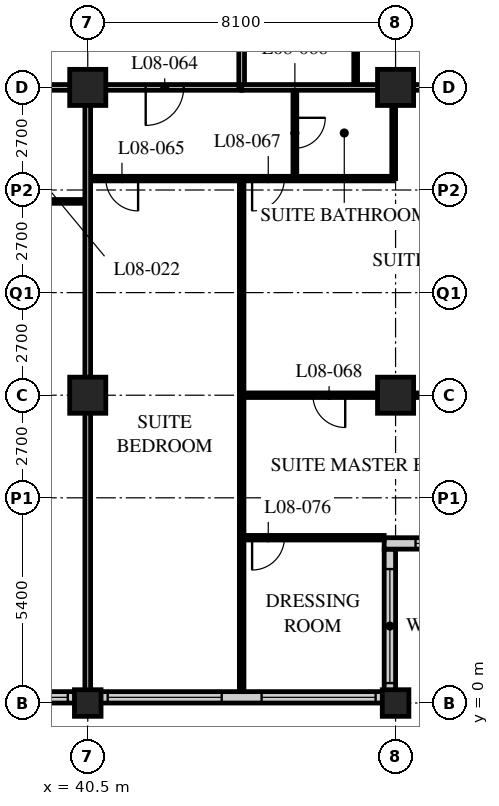
"""IFC4 building model, lengths in metres.
Left out: names, types, materials, properties, quantities, classifications, styles, units other than length and angle.
Written with IfcOpenShell. Run it as: python <this file> out.ifc"""

import sys

from ifc_helpers import new_model, si_unit, direction, frame, frame_2d, origin, origin_2d, place, context, subcontext, project, spatial, rectangle, hollow_rectangle, extrude, element, fill, save


model = new_model("IFC4")
c1 = context("Model", 3, precision=1e-05, world=origin(), true_north=direction((0.0, 1.0)))
c2 = subcontext(c1, "Body", "Model", "MODEL_VIEW")
j1 = project(units=[si_unit("LENGTHUNIT", "METRE"), si_unit("PLANEANGLEUNIT", "RADIAN")], contexts=[c1])
p1 = place(None, origin())
s1 = spatial("IfcSite", under=j1, at=p1, CompositionType="ELEMENT")
p2 = place(p1, origin())
s2 = spatial("IfcBuilding", under=s1, at=p2, CompositionType="ELEMENT")
p3 = place(p2, frame((0.0, 0.0, 39.8)))
s3 = spatial("IfcBuildingStorey", under=s2, at=p3, CompositionType="ELEMENT", Elevation=39.8)
p4 = place(p3, frame((40.5, 0.0, 0.0), z_axis=(0.0, 0.0, 1.0), x_axis=(1.0, 0.0, 0.0)))
e1 = element("IfcColumn", 1, at=p4, inside=s3, PredefinedType="COLUMN", context=c2, shape_type="SweptSolid", body=[
    extrude(hollow_rectangle(XDim=0.7, YDim=0.7, WallThickness=0.06, at=origin_2d()), origin(), (0.0, 0.0, 1.0), 3.4),
])
for number, where, z_axis, x_axis in (
    (2, (40.5, 8.1, 0.0), (0.0, 0.0, 1.0), (1.0, 0.0, 0.0)),
    (3, (40.5, 16.2, 0.0), (0.0, 0.0, 1.0), (1.0, 0.0, 0.0)),
):
    element("IfcColumn", number, at=place(p3, frame(where, z_axis=z_axis, x_axis=x_axis)), inside=s3, PredefinedType="COLUMN", context=c2, shape_type="SweptSolid", body=[
        extrude(hollow_rectangle(XDim=0.95, YDim=0.95, WallThickness=0.095, at=origin_2d()), origin(), (0.0, 0.0, 1.0), 3.4),
    ])
p5 = place(p3, frame((48.6, 0.0, 0.0), z_axis=(0.0, 0.0, 1.0), x_axis=(1.0, 0.0, 0.0)))
e4 = element("IfcColumn", 4, at=p5, inside=s3, PredefinedType="COLUMN", context=c2, shape_type="SweptSolid", body=[
    extrude(hollow_rectangle(XDim=0.7, YDim=0.7, WallThickness=0.06, at=origin_2d()), origin(), (0.0, 0.0, 1.0), 3.4),
])
for number, where, z_axis, x_axis in (
    (5, (48.6, 8.1, 0.0), (0.0, 0.0, 1.0), (1.0, 0.0, 0.0)),
    (6, (48.6, 16.2, 0.0), (0.0, 0.0, 1.0), (1.0, 0.0, 0.0)),
):
    element("IfcColumn", number, at=place(p3, frame(where, z_axis=z_axis, x_axis=x_axis)), inside=s3, PredefinedType="COLUMN", context=c2, shape_type="SweptSolid", body=[
        extrude(hollow_rectangle(XDim=0.95, YDim=0.95, WallThickness=0.095, at=origin_2d()), origin(), (0.0, 0.0, 1.0), 3.4),
    ])
p6 = place(p3, frame((8.4, 0.15, 0.0), z_axis=(0.0, 0.0, 1.0), x_axis=(1.0, 0.0, 0.0)))
e7 = element("IfcWall", 7, at=p6, inside=s3, PredefinedType="SOLIDWALL", context=c2, shape_type="SweptSolid", body=[
    extrude(rectangle(XDim=40.2, YDim=0.3, at=frame_2d((20.1, 0.0))), origin(), (0.0, 0.0, 1.0), 3.19),
])
p7 = place(p6, frame((0.225, 0.0, 0.9)))
e8 = element("IfcOpeningElement", 8, at=p7, cuts=e7, PredefinedType="OPENING", context=c2, shape_type="SweptSolid", body=[
    extrude(rectangle(XDim=3.0, YDim=2.0, at=frame_2d((1.5, 1.0))), frame((0.0, 0.16, 0.0), z_axis=(0.0, -1.0, 0.0), x_axis=(1.0, 0.0, 0.0)), (0.0, 0.0, 1.0), 0.32),
])
p8 = place(p6, frame((4.275, 0.0, 0.9)))
e9 = element("IfcOpeningElement", 9, at=p8, cuts=e7, PredefinedType="OPENING", context=c2, shape_type="SweptSolid", body=[
    extrude(rectangle(XDim=3.0, YDim=2.0, at=frame_2d((1.5, 1.0))), frame((0.0, 0.16, 0.0), z_axis=(0.0, -1.0, 0.0), x_axis=(1.0, 0.0, 0.0)), (0.0, 0.0, 1.0), 0.32),
])
p9 = place(p6, frame((8.325, 0.0, 0.9)))
e10 = element("IfcOpeningElement", 10, at=p9, cuts=e7, PredefinedType="OPENING", context=c2, shape_type="SweptSolid", body=[
    extrude(rectangle(XDim=3.0, YDim=2.0, at=frame_2d((1.5, 1.0))), frame((0.0, 0.16, 0.0), z_axis=(0.0, -1.0, 0.0), x_axis=(1.0, 0.0, 0.0)), (0.0, 0.0, 1.0), 0.32),
])
p10 = place(p6, frame((12.375, 0.0, 0.9)))
e11 = element("IfcOpeningElement", 11, at=p10, cuts=e7, PredefinedType="OPENING", context=c2, shape_type="SweptSolid", body=[
    extrude(rectangle(XDim=3.0, YDim=2.0, at=frame_2d((1.5, 1.0))), frame((0.0, 0.16, 0.0), z_axis=(0.0, -1.0, 0.0), x_axis=(1.0, 0.0, 0.0)), (0.0, 0.0, 1.0), 0.32),
])
p11 = place(p6, frame((16.425, 0.0, 0.9)))
e12 = element("IfcOpeningElement", 12, at=p11, cuts=e7, PredefinedType="OPENING", context=c2, shape_type="SweptSolid", body=[
    extrude(rectangle(XDim=3.0, YDim=2.0, at=frame_2d((1.5, 1.0))), frame((0.0, 0.16, 0.0), z_axis=(0.0, -1.0, 0.0), x_axis=(1.0, 0.0, 0.0)), (0.0, 0.0, 1.0), 0.32),
])
p12 = place(p6, frame((20.475, 0.0, 0.9)))
e13 = element("IfcOpeningElement", 13, at=p12, cuts=e7, PredefinedType="OPENING", context=c2, shape_type="SweptSolid", body=[
    extrude(rectangle(XDim=3.0, YDim=2.0, at=frame_2d((1.5, 1.0))), frame((0.0, 0.16, 0.0), z_axis=(0.0, -1.0, 0.0), x_axis=(1.0, 0.0, 0.0)), (0.0, 0.0, 1.0), 0.32),
])
p13 = place(p6, frame((24.525, 0.0, 0.9)))
e14 = element("IfcOpeningElement", 14, at=p13, cuts=e7, PredefinedType="OPENING", context=c2, shape_type="SweptSolid", body=[
    extrude(rectangle(XDim=3.0, YDim=2.0, at=frame_2d((1.5, 1.0))), frame((0.0, 0.16, 0.0), z_axis=(0.0, -1.0, 0.0), x_axis=(1.0, 0.0, 0.0)), (0.0, 0.0, 1.0), 0.32),
])
p14 = place(p6, frame((28.575, 0.0, 0.9)))
e15 = element("IfcOpeningElement", 15, at=p14, cuts=e7, PredefinedType="OPENING", context=c2, shape_type="SweptSolid", body=[
    extrude(rectangle(XDim=3.0, YDim=2.0, at=frame_2d((1.5, 1.0))), frame((0.0, 0.16, 0.0), z_axis=(0.0, -1.0, 0.0), x_axis=(1.0, 0.0, 0.0)), (0.0, 0.0, 1.0), 0.32),
])
p15 = place(p6, frame((32.625, 0.0, 0.9)))
e16 = element("IfcOpeningElement", 16, at=p15, cuts=e7, PredefinedType="OPENING", context=c2, shape_type="SweptSolid", body=[
    extrude(rectangle(XDim=3.0, YDim=2.0, at=frame_2d((1.5, 1.0))), frame((0.0, 0.16, 0.0), z_axis=(0.0, -1.0, 0.0), x_axis=(1.0, 0.0, 0.0)), (0.0, 0.0, 1.0), 0.32),
])
p16 = place(p6, frame((36.675, 0.0, 0.9)))
e17 = element("IfcOpeningElement", 17, at=p16, cuts=e7, PredefinedType="OPENING", context=c2, shape_type="SweptSolid", body=[
    extrude(rectangle(XDim=3.0, YDim=2.0, at=frame_2d((1.5, 1.0))), frame((0.0, 0.16, 0.0), z_axis=(0.0, -1.0, 0.0), x_axis=(1.0, 0.0, 0.0)), (0.0, 0.0, 1.0), 0.32),
])
p17 = place(p3, frame((48.45, 0.3, 0.0), z_axis=(0.0, 0.0, 1.0), x_axis=(0.0, 1.0, 0.0)))
e18 = element("IfcWall", 18, at=p17, inside=s3, PredefinedType="SOLIDWALL", context=c2, shape_type="SweptSolid", body=[
    extrude(rectangle(XDim=3.75, YDim=0.3, at=frame_2d((1.875, 0.0))), origin(), (0.0, 0.0, 1.0), 3.19),
])
p18 = place(p17, frame((0.225, 0.0, 0.9)))
e19 = element("IfcOpeningElement", 19, at=p18, cuts=e18, PredefinedType="OPENING", context=c2, shape_type="SweptSolid", body=[
    extrude(rectangle(XDim=3.0, YDim=1.5, at=frame_2d((1.5, 0.75))), frame((0.0, 0.16, 0.0), z_axis=(0.0, -1.0, 0.0), x_axis=(1.0, 0.0, 0.0)), (0.0, 0.0, 1.0), 0.32),
])
p19 = place(p3, frame((48.3, 4.2, 0.0), z_axis=(0.0, 0.0, 1.0), x_axis=(1.0, 0.0, 0.0)))
e20 = element("IfcWall", 20, at=p19, inside=s3, PredefinedType="SOLIDWALL", context=c2, shape_type="SweptSolid", body=[
    extrude(rectangle(XDim=4.35, YDim=0.3, at=frame_2d((2.175, 0.0))), origin(), (0.0, 0.0, 1.0), 3.19),
])
p20 = place(p19, frame((0.825, 0.0, 0.9)))
e21 = element("IfcOpeningElement", 21, at=p20, cuts=e20, PredefinedType="OPENING", context=c2, shape_type="SweptSolid", body=[
    extrude(rectangle(XDim=3.0, YDim=1.5, at=frame_2d((1.5, 0.75))), frame((0.0, 0.16, 0.0), z_axis=(0.0, -1.0, 0.0), x_axis=(1.0, 0.0, 0.0)), (0.0, 0.0, 1.0), 0.32),
])
p21 = place(p3, frame((12.15, 16.2, 0.0), z_axis=(0.0, 0.0, 1.0), x_axis=(1.0, 0.0, 0.0)))
e22 = element("IfcWall", 22, at=p21, inside=s3, PredefinedType="PARTITIONING", context=c2, shape_type="SweptSolid", body=[
    extrude(rectangle(XDim=32.4, YDim=0.15, at=frame_2d((16.2, 0.0))), origin(), (0.0, 0.0, 1.0), 2.578),
])
p22 = place(p21, frame((6.5, 0.0, 0.0)))
e23 = element("IfcOpeningElement", 23, at=p22, cuts=e22, PredefinedType="OPENING", context=c2, shape_type="SweptSolid", body=[
    extrude(rectangle(XDim=1.0, YDim=2.1, at=frame_2d((0.5, 1.05))), frame((0.0, 0.085, 0.0), z_axis=(0.0, -1.0, 0.0), x_axis=(1.0, 0.0, 0.0)), (0.0, 0.0, 1.0), 0.17),
])
p23 = place(p21, frame((8.4, 0.0, 0.0)))
e24 = element("IfcOpeningElement", 24, at=p23, cuts=e22, PredefinedType="OPENING", context=c2, shape_type="SweptSolid", body=[
    extrude(rectangle(XDim=1.0, YDim=2.1, at=frame_2d((0.5, 1.05))), frame((0.0, 0.085, 0.0), z_axis=(0.0, -1.0, 0.0), x_axis=(1.0, 0.0, 0.0)), (0.0, 0.0, 1.0), 0.17),
])
p24 = place(p21, frame((14.6, 0.0, 0.0)))
e25 = element("IfcOpeningElement", 25, at=p24, cuts=e22, PredefinedType="OPENING", context=c2, shape_type="SweptSolid", body=[
    extrude(rectangle(XDim=1.0, YDim=2.1, at=frame_2d((0.5, 1.05))), frame((0.0, 0.085, 0.0), z_axis=(0.0, -1.0, 0.0), x_axis=(1.0, 0.0, 0.0)), (0.0, 0.0, 1.0), 0.17),
])
p25 = place(p21, frame((16.5, 0.0, 0.0)))
e26 = element("IfcOpeningElement", 26, at=p25, cuts=e22, PredefinedType="OPENING", context=c2, shape_type="SweptSolid", body=[
    extrude(rectangle(XDim=1.0, YDim=2.1, at=frame_2d((0.5, 1.05))), frame((0.0, 0.085, 0.0), z_axis=(0.0, -1.0, 0.0), x_axis=(1.0, 0.0, 0.0)), (0.0, 0.0, 1.0), 0.17),
])
p26 = place(p21, frame((23.0, 0.0, 0.0)))
e27 = element("IfcOpeningElement", 27, at=p26, cuts=e22, PredefinedType="OPENING", context=c2, shape_type="SweptSolid", body=[
    extrude(rectangle(XDim=1.0, YDim=2.1, at=frame_2d((0.5, 1.05))), frame((0.0, 0.085, 0.0), z_axis=(0.0, -1.0, 0.0), x_axis=(1.0, 0.0, 0.0)), (0.0, 0.0, 1.0), 0.17),
])
p27 = place(p21, frame((24.6, 0.0, 0.0)))
e28 = element("IfcOpeningElement", 28, at=p27, cuts=e22, PredefinedType="OPENING", context=c2, shape_type="SweptSolid", body=[
    extrude(rectangle(XDim=1.0, YDim=2.1, at=frame_2d((0.5, 1.05))), frame((0.0, 0.085, 0.0), z_axis=(0.0, -1.0, 0.0), x_axis=(1.0, 0.0, 0.0)), (0.0, 0.0, 1.0), 0.17),
])
p28 = place(p21, frame((1.525, 0.0, 0.0)))
e29 = element("IfcOpeningElement", 29, at=p28, cuts=e22, PredefinedType="OPENING", context=c2, shape_type="SweptSolid", body=[
    extrude(rectangle(XDim=1.0, YDim=2.1, at=frame_2d((0.5, 1.05))), frame((0.0, 0.085, 0.0), z_axis=(0.0, -1.0, 0.0), x_axis=(1.0, 0.0, 0.0)), (0.0, 0.0, 1.0), 0.17),
])
p29 = place(p21, frame((29.875, 0.0, 0.0)))
e30 = element("IfcOpeningElement", 30, at=p29, cuts=e22, PredefinedType="OPENING", context=c2, shape_type="SweptSolid", body=[
    extrude(rectangle(XDim=1.0, YDim=2.1, at=frame_2d((0.5, 1.05))), frame((0.0, 0.085, 0.0), z_axis=(0.0, -1.0, 0.0), x_axis=(1.0, 0.0, 0.0)), (0.0, 0.0, 1.0), 0.17),
])
p30 = place(p3, frame((44.55, 16.2, 0.0), z_axis=(0.0, 0.0, 1.0), x_axis=(0.0, 1.0, 0.0)))
e31 = element("IfcWall", 31, at=p30, inside=s3, PredefinedType="PARTITIONING", context=c2, shape_type="SweptSolid", body=[
    extrude(rectangle(XDim=26.1, YDim=0.15, at=frame_2d((13.05, 0.0))), origin(), (0.0, 0.0, 1.0), 3.19),
])
p31 = place(p30, frame((2.75, 0.0, 0.0)))
e32 = element("IfcOpeningElement", 32, at=p31, cuts=e31, PredefinedType="OPENING", context=c2, shape_type="SweptSolid", body=[
    extrude(rectangle(XDim=1.0, YDim=2.1, at=frame_2d((0.5, 1.05))), frame((0.0, 0.085, 0.0), z_axis=(0.0, -1.0, 0.0), x_axis=(1.0, 0.0, 0.0)), (0.0, 0.0, 1.0), 0.17),
])
p32 = place(p30, frame((4.35, 0.0, 0.0)))
e33 = element("IfcOpeningElement", 33, at=p32, cuts=e31, PredefinedType="OPENING", context=c2, shape_type="SweptSolid", body=[
    extrude(rectangle(XDim=1.0, YDim=2.1, at=frame_2d((0.5, 1.05))), frame((0.0, 0.085, 0.0), z_axis=(0.0, -1.0, 0.0), x_axis=(1.0, 0.0, 0.0)), (0.0, 0.0, 1.0), 0.17),
])
p33 = place(p30, frame((8.4, 0.0, 0.0)))
e34 = element("IfcOpeningElement", 34, at=p33, cuts=e31, PredefinedType="OPENING", context=c2, shape_type="SweptSolid", body=[
    extrude(rectangle(XDim=1.0, YDim=2.1, at=frame_2d((0.5, 1.05))), frame((0.0, 0.085, 0.0), z_axis=(0.0, -1.0, 0.0), x_axis=(1.0, 0.0, 0.0)), (0.0, 0.0, 1.0), 0.17),
])
p34 = place(p30, frame((14.6, 0.0, 0.0)))
e35 = element("IfcOpeningElement", 35, at=p34, cuts=e31, PredefinedType="OPENING", context=c2, shape_type="SweptSolid", body=[
    extrude(rectangle(XDim=1.0, YDim=2.1, at=frame_2d((0.5, 1.05))), frame((0.0, 0.085, 0.0), z_axis=(0.0, -1.0, 0.0), x_axis=(1.0, 0.0, 0.0)), (0.0, 0.0, 1.0), 0.17),
])
p35 = place(p30, frame((18.65, 0.0, 0.0)))
e36 = element("IfcOpeningElement", 36, at=p35, cuts=e31, PredefinedType="OPENING", context=c2, shape_type="SweptSolid", body=[
    extrude(rectangle(XDim=1.0, YDim=2.1, at=frame_2d((0.5, 1.05))), frame((0.0, 0.085, 0.0), z_axis=(0.0, -1.0, 0.0), x_axis=(1.0, 0.0, 0.0)), (0.0, 0.0, 1.0), 0.17),
])
p36 = place(p30, frame((22.65, 0.0, 0.0)))
e37 = element("IfcOpeningElement", 37, at=p36, cuts=e31, PredefinedType="OPENING", context=c2, shape_type="SweptSolid", body=[
    extrude(rectangle(XDim=1.0, YDim=2.1, at=frame_2d((0.5, 1.05))), frame((0.0, 0.085, 0.0), z_axis=(0.0, -1.0, 0.0), x_axis=(1.0, 0.0, 0.0)), (0.0, 0.0, 1.0), 0.17),
])
for number, where, z_axis, x_axis in (
    (38, (37.9, 13.2, 0.0), (0.0, 0.0, 1.0), (1.0, 0.0, 0.0)),
    (39, (47.55, 16.2, 0.0), (0.0, 0.0, 1.0), (0.0, 1.0, 0.0)),
):
    element("IfcWall", number, at=place(p3, frame(where, z_axis=z_axis, x_axis=x_axis)), inside=s3, PredefinedType="PARTITIONING", context=c2, shape_type="SweptSolid", body=[
        extrude(rectangle(XDim=2.6, YDim=0.1, at=frame_2d((1.3, 0.0))), origin(), (0.0, 0.0, 1.0), 3.19),
    ])
p37 = place(p3, frame((40.5, 13.8, 0.0), z_axis=(0.0, 0.0, 1.0), x_axis=(1.0, 0.0, 0.0)))
e40 = element("IfcWall", 40, at=p37, inside=s3, PredefinedType="PARTITIONING", context=c2, shape_type="SweptSolid", body=[
    extrude(rectangle(XDim=8.05, YDim=0.12, at=frame_2d((4.025, 0.0))), origin(), (0.0, 0.0, 1.0), 3.19),
])
p38 = place(p37, frame((0.475, 0.0, 0.0)))
e41 = element("IfcOpeningElement", 41, at=p38, cuts=e40, PredefinedType="OPENING", context=c2, shape_type="SweptSolid", body=[
    extrude(rectangle(XDim=0.85, YDim=2.1, at=frame_2d((0.425, 1.05))), frame((0.0, 0.07, 0.0), z_axis=(0.0, -1.0, 0.0), x_axis=(1.0, 0.0, 0.0)), (0.0, 0.0, 1.0), 0.14),
])
p39 = place(p37, frame((4.325, 0.0, 0.0)))
e42 = element("IfcOpeningElement", 42, at=p39, cuts=e40, PredefinedType="OPENING", context=c2, shape_type="SweptSolid", body=[
    extrude(rectangle(XDim=0.85, YDim=2.1, at=frame_2d((0.425, 1.05))), frame((0.0, 0.07, 0.0), z_axis=(0.0, -1.0, 0.0), x_axis=(1.0, 0.0, 0.0)), (0.0, 0.0, 1.0), 0.14),
])
p40 = place(p3, frame((45.95, 16.2, 0.0), z_axis=(0.0, 0.0, 1.0), x_axis=(0.0, -1.0, 0.0)))
e43 = element("IfcWall", 43, at=p40, inside=s3, PredefinedType="PARTITIONING", context=c2, shape_type="SweptSolid", body=[
    extrude(rectangle(XDim=2.4, YDim=0.1, at=frame_2d((1.2, 0.0))), origin(), (0.0, 0.0, 1.0), 3.19),
])
p41 = place(p40, frame((0.8, 0.0, 0.0)))
e44 = element("IfcOpeningElement", 44, at=p41, cuts=e43, PredefinedType="OPENING", context=c2, shape_type="SweptSolid", body=[
    extrude(rectangle(XDim=0.8, YDim=2.1, at=frame_2d((0.4, 1.05))), frame((0.0, 0.06, 0.0), z_axis=(0.0, -1.0, 0.0), x_axis=(1.0, 0.0, 0.0)), (0.0, 0.0, 1.0), 0.12),
])
p42 = place(p3, frame((48.55, 16.2, 0.0), z_axis=(0.0, 0.0, 1.0), x_axis=(0.0, -1.0, 0.0)))
e45 = element("IfcWall", 45, at=p42, inside=s3, PredefinedType="PARTITIONING", context=c2, shape_type="SweptSolid", body=[
    extrude(rectangle(XDim=2.4, YDim=0.1, at=frame_2d((1.2, 0.0))), origin(), (0.0, 0.0, 1.0), 2.578),
])
p43 = place(p3, frame((44.55, 13.8, 0.0), z_axis=(0.0, 0.0, 1.0), x_axis=(0.0, -1.0, 0.0)))
e46 = element("IfcWall", 46, at=p43, inside=s3, PredefinedType="PARTITIONING", context=c2, shape_type="SweptSolid", body=[
    extrude(rectangle(XDim=13.5, YDim=0.12, at=frame_2d((6.75, 0.0))), origin(), (0.0, 0.0, 1.0), 3.19),
])
p44 = place(p3, frame((44.55, 8.1, 0.0), z_axis=(0.0, 0.0, 1.0), x_axis=(1.0, 0.0, 0.0)))
e47 = element("IfcWall", 47, at=p44, inside=s3, PredefinedType="PARTITIONING", context=c2, shape_type="SweptSolid", body=[
    extrude(rectangle(XDim=7.8, YDim=0.12, at=frame_2d((3.9, 0.0))), origin(), (0.0, 0.0, 1.0), 2.578),
])
p45 = place(p44, frame((1.875, 0.0, 0.0)))
e48 = element("IfcOpeningElement", 48, at=p45, cuts=e47, PredefinedType="OPENING", context=c2, shape_type="SweptSolid", body=[
    extrude(rectangle(XDim=0.85, YDim=2.1, at=frame_2d((0.425, 1.05))), frame((0.0, 0.07, 0.0), z_axis=(0.0, -1.0, 0.0), x_axis=(1.0, 0.0, 0.0)), (0.0, 0.0, 1.0), 0.14),
])
p46 = place(p3, frame((44.55, 16.2, 0.0), z_axis=(0.0, 0.0, 1.0), x_axis=(1.0, 0.0, 0.0)))
e49 = element("IfcWall", 49, at=p46, inside=s3, PredefinedType="PARTITIONING", context=c2, shape_type="SweptSolid", body=[
    extrude(rectangle(XDim=11.85, YDim=0.15, at=frame_2d((5.925, 0.0))), origin(), (0.0, 0.0, 1.0), 2.578),
])
p47 = place(p3, frame((40.5, 16.2, 0.0), z_axis=(0.0, 0.0, 1.0), x_axis=(0.0, -1.0, 0.0)))
e50 = element("IfcWall", 50, at=p47, inside=s3, PredefinedType="PARTITIONING", context=c2, shape_type="SweptSolid", body=[
    extrude(rectangle(XDim=15.9, YDim=0.15, at=frame_2d((7.95, 0.0))), origin(), (0.0, 0.0, 1.0), 2.578),
])
p48 = place(p3, frame((44.55, 4.35, 0.0), z_axis=(0.0, 0.0, 1.0), x_axis=(1.0, 0.0, 0.0)))
e51 = element("IfcWall", 51, at=p48, inside=s3, PredefinedType="PARTITIONING", context=c2, shape_type="SweptSolid", body=[
    extrude(rectangle(XDim=3.75, YDim=0.12, at=frame_2d((1.875, 0.0))), origin(), (0.0, 0.0, 1.0), 3.19),
])
p49 = place(p48, frame((0.275, 0.0, 0.0)))
e52 = element("IfcOpeningElement", 52, at=p49, cuts=e51, PredefinedType="OPENING", context=c2, shape_type="SweptSolid", body=[
    extrude(rectangle(XDim=0.85, YDim=2.1, at=frame_2d((0.425, 1.05))), frame((0.0, 0.07, 0.0), z_axis=(0.0, -1.0, 0.0), x_axis=(1.0, 0.0, 0.0)), (0.0, 0.0, 1.0), 0.14),
])
p50 = place(p14, origin())
e53 = element("IfcWindow", 53, at=p50, inside=s3, PartitioningType="SINGLE_PANEL", PredefinedType="WINDOW", context=c2, shape_type="SweptSolid", body=[
    extrude(rectangle(XDim=3.0, YDim=2.0, at=frame_2d((1.5, 1.0))), frame((0.0, 0.03, 0.0), z_axis=(0.0, -1.0, 0.0), x_axis=(1.0, 0.0, 0.0)), (0.0, 0.0, 1.0), 0.06),
])
fill(e15, e53)
p51 = place(p15, origin())
e54 = element("IfcWindow", 54, at=p51, inside=s3, PartitioningType="SINGLE_PANEL", PredefinedType="WINDOW", context=c2, shape_type="SweptSolid", body=[
    extrude(rectangle(XDim=3.0, YDim=2.0, at=frame_2d((1.5, 1.0))), frame((0.0, 0.03, 0.0), z_axis=(0.0, -1.0, 0.0), x_axis=(1.0, 0.0, 0.0)), (0.0, 0.0, 1.0), 0.06),
])
fill(e16, e54)
p52 = place(p16, origin())
e55 = element("IfcWindow", 55, at=p52, inside=s3, PartitioningType="SINGLE_PANEL", PredefinedType="WINDOW", context=c2, shape_type="SweptSolid", body=[
    extrude(rectangle(XDim=3.0, YDim=2.0, at=frame_2d((1.5, 1.0))), frame((0.0, 0.03, 0.0), z_axis=(0.0, -1.0, 0.0), x_axis=(1.0, 0.0, 0.0)), (0.0, 0.0, 1.0), 0.06),
])
fill(e17, e55)
p53 = place(p18, origin())
e56 = element("IfcWindow", 56, at=p53, inside=s3, PartitioningType="SINGLE_PANEL", PredefinedType="WINDOW", context=c2, shape_type="SweptSolid", body=[
    extrude(rectangle(XDim=3.0, YDim=1.5, at=frame_2d((1.5, 0.75))), frame((0.0, 0.03, 0.0), z_axis=(0.0, -1.0, 0.0), x_axis=(1.0, 0.0, 0.0)), (0.0, 0.0, 1.0), 0.06),
])
fill(e19, e56)
p54 = place(p20, origin())
e57 = element("IfcWindow", 57, at=p54, inside=s3, PartitioningType="SINGLE_PANEL", PredefinedType="WINDOW", context=c2, shape_type="SweptSolid", body=[
    extrude(rectangle(XDim=3.0, YDim=1.5, at=frame_2d((1.5, 0.75))), frame((0.0, 0.03, 0.0), z_axis=(0.0, -1.0, 0.0), x_axis=(1.0, 0.0, 0.0)), (0.0, 0.0, 1.0), 0.06),
])
fill(e21, e57)
p55 = place(p29, origin())
e58 = element("IfcDoor", 58, at=p55, inside=s3, OperationType="SINGLE_SWING_RIGHT", PredefinedType="DOOR", context=c2, shape_type="SweptSolid", body=[
    extrude(rectangle(XDim=1.0, YDim=2.1, at=frame_2d((0.5, 1.05))), frame((0.0, 0.025, 0.0), z_axis=(0.0, -1.0, 0.0), x_axis=(1.0, 0.0, 0.0)), (0.0, 0.0, 1.0), 0.05),
])
fill(e30, e58)
p56 = place(p38, origin())
e59 = element("IfcDoor", 59, at=p56, inside=s3, OperationType="SINGLE_SWING_LEFT", PredefinedType="DOOR", context=c2, shape_type="SweptSolid", body=[
    extrude(rectangle(XDim=0.85, YDim=2.1, at=frame_2d((0.425, 1.05))), frame((0.0, 0.025, 0.0), z_axis=(0.0, -1.0, 0.0), x_axis=(1.0, 0.0, 0.0)), (0.0, 0.0, 1.0), 0.05),
])
fill(e41, e59)
p57 = place(p41, origin())
e60 = element("IfcDoor", 60, at=p57, inside=s3, OperationType="SINGLE_SWING_LEFT", PredefinedType="DOOR", context=c2, shape_type="SweptSolid", body=[
    extrude(rectangle(XDim=0.8, YDim=2.1, at=frame_2d((0.4, 1.05))), frame((0.0, 0.025, 0.0), z_axis=(0.0, -1.0, 0.0), x_axis=(1.0, 0.0, 0.0)), (0.0, 0.0, 1.0), 0.05),
])
fill(e44, e60)
p58 = place(p39, origin())
e61 = element("IfcDoor", 61, at=p58, inside=s3, OperationType="SINGLE_SWING_RIGHT", PredefinedType="DOOR", context=c2, shape_type="SweptSolid", body=[
    extrude(rectangle(XDim=0.85, YDim=2.1, at=frame_2d((0.425, 1.05))), frame((0.0, 0.025, 0.0), z_axis=(0.0, -1.0, 0.0), x_axis=(1.0, 0.0, 0.0)), (0.0, 0.0, 1.0), 0.05),
])
fill(e42, e61)
p59 = place(p45, origin())
e62 = element("IfcDoor", 62, at=p59, inside=s3, OperationType="SINGLE_SWING_LEFT", PredefinedType="DOOR", context=c2, shape_type="SweptSolid", body=[
    extrude(rectangle(XDim=0.85, YDim=2.1, at=frame_2d((0.425, 1.05))), frame((0.0, 0.025, 0.0), z_axis=(0.0, -1.0, 0.0), x_axis=(1.0, 0.0, 0.0)), (0.0, 0.0, 1.0), 0.05),
])
fill(e48, e62)
p60 = place(p49, origin())
e63 = element("IfcDoor", 63, at=p60, inside=s3, OperationType="SINGLE_SWING_RIGHT", PredefinedType="DOOR", context=c2, shape_type="SweptSolid", body=[
    extrude(rectangle(XDim=0.85, YDim=2.1, at=frame_2d((0.425, 1.05))), frame((0.0, 0.025, 0.0), z_axis=(0.0, -1.0, 0.0), x_axis=(1.0, 0.0, 0.0)), (0.0, 0.0, 1.0), 0.05),
])
fill(e52, e63)
save(model, sys.argv[1])
